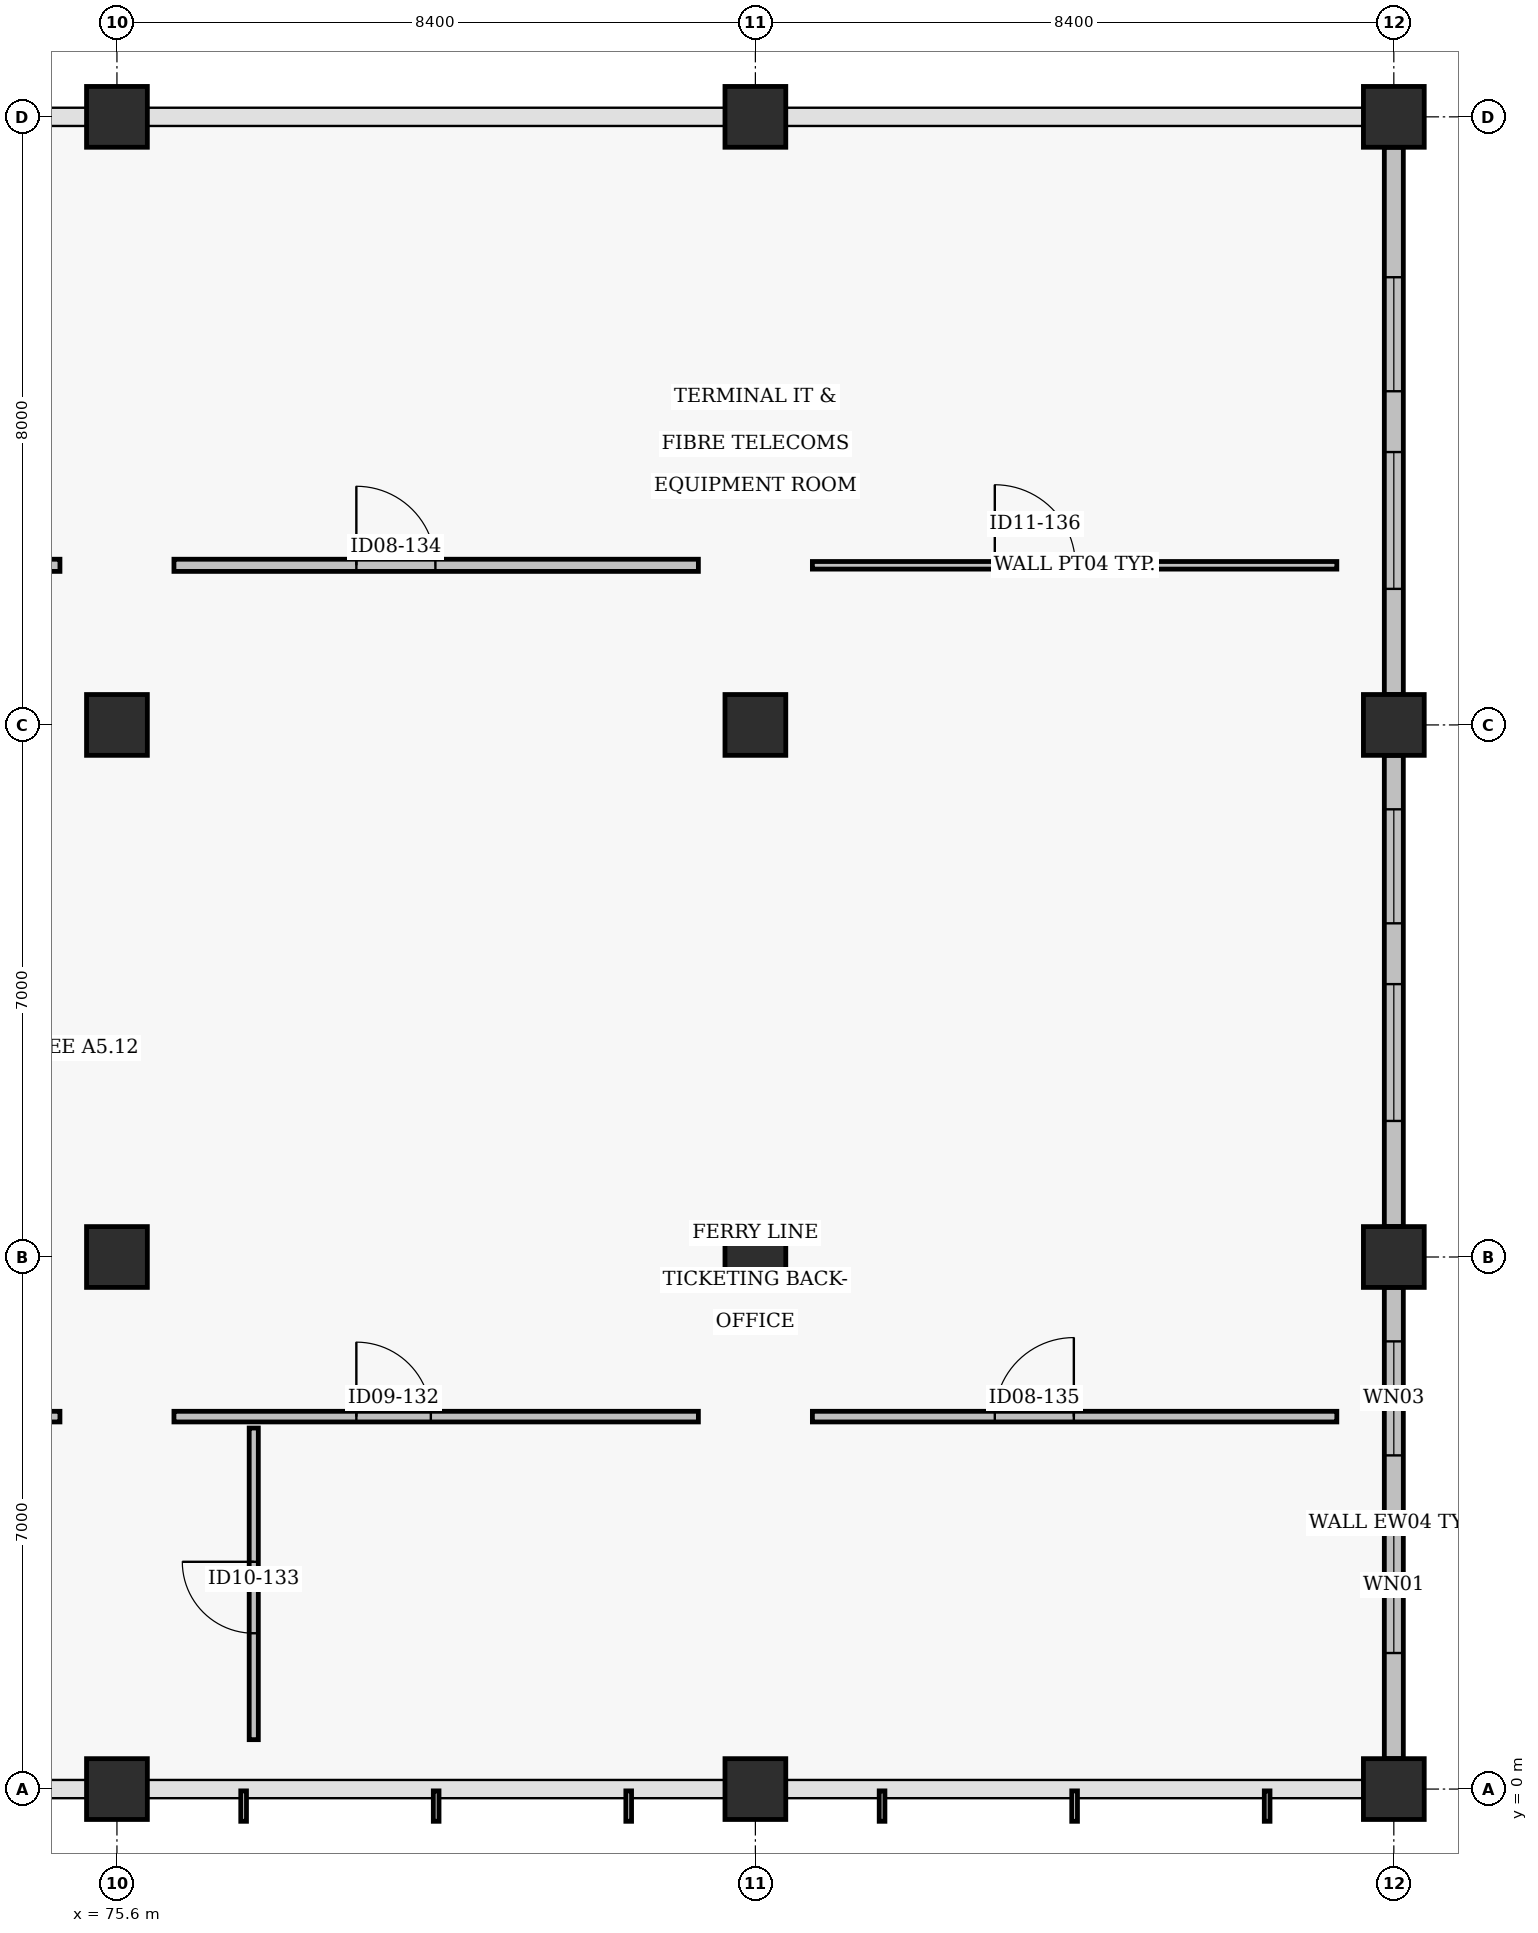
"""IFC4 building model, lengths in metres.
Left out: names, types, materials, properties, quantities, classifications, styles, units other than length and angle.
Written with IfcOpenShell. Run it as: python <this file> out.ifc"""

import sys

from ifc_helpers import new_model, si_unit, direction, frame, frame_2d, origin, origin_2d, place, context, subcontext, project, spatial, rectangle, extrude, element, fill, save


model = new_model("IFC4")
c1 = context("Model", 3, precision=1e-05, world=origin(), true_north=direction((0.0, 1.0)))
c2 = subcontext(c1, "Body", "Model", "MODEL_VIEW")
j1 = project(units=[si_unit("LENGTHUNIT", "METRE"), si_unit("PLANEANGLEUNIT", "RADIAN")], contexts=[c1])
p1 = place(None, origin())
s1 = spatial("IfcSite", under=j1, at=p1, CompositionType="ELEMENT")
p2 = place(p1, origin())
s2 = spatial("IfcBuilding", under=s1, at=p2, CompositionType="ELEMENT")
p3 = place(p2, frame((0.0, 0.0, 5.44)))
s3 = spatial("IfcBuildingStorey", under=s2, at=p3, CompositionType="ELEMENT", Elevation=5.44)
for number, where, z_axis, x_axis in (
    (1, (75.6, 0.0, 0.0), (0.0, 0.0, 1.0), (1.0, 0.0, 0.0)),
    (2, (75.6, 7.0, 0.0), (0.0, 0.0, 1.0), (1.0, 0.0, 0.0)),
    (3, (75.6, 14.0, 0.0), (0.0, 0.0, 1.0), (1.0, 0.0, 0.0)),
    (4, (75.6, 22.0, 0.0), (0.0, 0.0, 1.0), (1.0, 0.0, 0.0)),
    (5, (84.0, 0.0, 0.0), (0.0, 0.0, 1.0), (1.0, 0.0, 0.0)),
    (6, (84.0, 7.0, 0.0), (0.0, 0.0, 1.0), (1.0, 0.0, 0.0)),
    (7, (84.0, 14.0, 0.0), (0.0, 0.0, 1.0), (1.0, 0.0, 0.0)),
    (8, (84.0, 22.0, 0.0), (0.0, 0.0, 1.0), (1.0, 0.0, 0.0)),
    (9, (92.4, 0.0, 0.0), (0.0, 0.0, 1.0), (1.0, 0.0, 0.0)),
    (10, (92.4, 7.0, 0.0), (0.0, 0.0, 1.0), (1.0, 0.0, 0.0)),
    (11, (92.4, 14.0, 0.0), (0.0, 0.0, 1.0), (1.0, 0.0, 0.0)),
    (12, (92.4, 22.0, 0.0), (0.0, 0.0, 1.0), (1.0, 0.0, 0.0)),
):
    element("IfcColumn", number, at=place(p3, frame(where, z_axis=z_axis, x_axis=x_axis)), inside=s3, PredefinedType="COLUMN", context=c2, shape_type="SweptSolid", body=[
        extrude(rectangle(XDim=0.8, YDim=0.8, at=origin_2d()), origin(), (0.0, 0.0, 1.0), 4.16),
    ])
p4 = place(p3, frame((92.4, 0.4, 0.0), z_axis=(0.0, 0.0, 1.0), x_axis=(0.0, 1.0, 0.0)))
e13 = element("IfcWall", 13, at=p4, inside=s3, PredefinedType="SOLIDWALL", context=c2, shape_type="SweptSolid", body=[
    extrude(rectangle(XDim=6.2, YDim=0.25, at=frame_2d((3.1, 0.0))), origin(), (0.0, 0.0, 1.0), 3.345),
])
p5 = place(p4, frame((1.39, 0.0, 0.95)))
e14 = element("IfcOpeningElement", 14, at=p5, cuts=e13, PredefinedType="OPENING", context=c2, shape_type="SweptSolid", body=[
    extrude(rectangle(XDim=1.8, YDim=1.5, at=frame_2d((0.9, 0.75))), frame((0.0, 0.135, 0.0), z_axis=(0.0, -1.0, 0.0), x_axis=(1.0, 0.0, 0.0)), (0.0, 0.0, 1.0), 0.27),
])
p6 = place(p4, frame((3.99, 0.0, 0.95)))
e15 = element("IfcOpeningElement", 15, at=p6, cuts=e13, PredefinedType="OPENING", context=c2, shape_type="SweptSolid", body=[
    extrude(rectangle(XDim=1.5, YDim=1.5, at=frame_2d((0.75, 0.75))), frame((0.0, 0.135, 0.0), z_axis=(0.0, -1.0, 0.0), x_axis=(1.0, 0.0, 0.0)), (0.0, 0.0, 1.0), 0.27),
])
p7 = place(p3, frame((92.4, 7.4, 0.0), z_axis=(0.0, 0.0, 1.0), x_axis=(0.0, 1.0, 0.0)))
e16 = element("IfcWall", 16, at=p7, inside=s3, PredefinedType="SOLIDWALL", context=c2, shape_type="SweptSolid", body=[
    extrude(rectangle(XDim=6.2, YDim=0.25, at=frame_2d((3.1, 0.0))), origin(), (0.0, 0.0, 1.0), 3.345),
])
p8 = place(p7, frame((1.39, 0.0, 0.95)))
e17 = element("IfcOpeningElement", 17, at=p8, cuts=e16, PredefinedType="OPENING", context=c2, shape_type="SweptSolid", body=[
    extrude(rectangle(XDim=1.8, YDim=1.5, at=frame_2d((0.9, 0.75))), frame((0.0, 0.135, 0.0), z_axis=(0.0, -1.0, 0.0), x_axis=(1.0, 0.0, 0.0)), (0.0, 0.0, 1.0), 0.27),
])
p9 = place(p7, frame((3.99, 0.0, 0.95)))
e18 = element("IfcOpeningElement", 18, at=p9, cuts=e16, PredefinedType="OPENING", context=c2, shape_type="SweptSolid", body=[
    extrude(rectangle(XDim=1.5, YDim=1.5, at=frame_2d((0.75, 0.75))), frame((0.0, 0.135, 0.0), z_axis=(0.0, -1.0, 0.0), x_axis=(1.0, 0.0, 0.0)), (0.0, 0.0, 1.0), 0.27),
])
p10 = place(p3, frame((92.4, 14.4, 0.0), z_axis=(0.0, 0.0, 1.0), x_axis=(0.0, 1.0, 0.0)))
e19 = element("IfcWall", 19, at=p10, inside=s3, PredefinedType="SOLIDWALL", context=c2, shape_type="SweptSolid", body=[
    extrude(rectangle(XDim=7.2, YDim=0.25, at=frame_2d((3.6, 0.0))), origin(), (0.0, 0.0, 1.0), 3.345),
])
p11 = place(p10, frame((1.39, 0.0, 0.95)))
e20 = element("IfcOpeningElement", 20, at=p11, cuts=e19, PredefinedType="OPENING", context=c2, shape_type="SweptSolid", body=[
    extrude(rectangle(XDim=1.8, YDim=1.5, at=frame_2d((0.9, 0.75))), frame((0.0, 0.135, 0.0), z_axis=(0.0, -1.0, 0.0), x_axis=(1.0, 0.0, 0.0)), (0.0, 0.0, 1.0), 0.27),
])
p12 = place(p10, frame((3.99, 0.0, 0.95)))
e21 = element("IfcOpeningElement", 21, at=p12, cuts=e19, PredefinedType="OPENING", context=c2, shape_type="SweptSolid", body=[
    extrude(rectangle(XDim=1.5, YDim=1.5, at=frame_2d((0.75, 0.75))), frame((0.0, 0.135, 0.0), z_axis=(0.0, -1.0, 0.0), x_axis=(1.0, 0.0, 0.0)), (0.0, 0.0, 1.0), 0.27),
])
p13 = place(p3, frame((67.95, 4.9, 0.0), z_axis=(0.0, 0.0, 1.0), x_axis=(1.0, 0.0, 0.0)))
e22 = element("IfcWall", 22, at=p13, inside=s3, PredefinedType="PARTITIONING", context=c2, shape_type="SweptSolid", body=[
    extrude(rectangle(XDim=6.9, YDim=0.14, at=frame_2d((3.45, 0.0))), origin(), (0.0, 0.0, 1.0), 2.55),
])
p14 = place(p13, frame((2.4, 0.0, 0.0)))
e23 = element("IfcOpeningElement", 23, at=p14, cuts=e22, PredefinedType="OPENING", context=c2, shape_type="SweptSolid", body=[
    extrude(rectangle(XDim=1.04, YDim=2.14, at=frame_2d((0.52, 1.07))), frame((0.0, 0.08, 0.0), z_axis=(0.0, -1.0, 0.0), x_axis=(1.0, 0.0, 0.0)), (0.0, 0.0, 1.0), 0.16),
])
p15 = place(p3, frame((67.95, 16.1, 0.0), z_axis=(0.0, 0.0, 1.0), x_axis=(1.0, 0.0, 0.0)))
e24 = element("IfcWall", 24, at=p15, inside=s3, PredefinedType="PARTITIONING", context=c2, shape_type="SweptSolid", body=[
    extrude(rectangle(XDim=6.9, YDim=0.16, at=frame_2d((3.45, 0.0))), origin(), (0.0, 0.0, 1.0), 2.5),
])
p16 = place(p15, frame((2.4, 0.0, 0.0)))
e25 = element("IfcOpeningElement", 25, at=p16, cuts=e24, PredefinedType="OPENING", context=c2, shape_type="SweptSolid", body=[
    extrude(rectangle(XDim=1.04, YDim=2.14, at=frame_2d((0.52, 1.07))), frame((0.0, 0.09, 0.0), z_axis=(0.0, -1.0, 0.0), x_axis=(1.0, 0.0, 0.0)), (0.0, 0.0, 1.0), 0.18),
])
p17 = place(p3, frame((76.35, 4.9, 0.0), z_axis=(0.0, 0.0, 1.0), x_axis=(1.0, 0.0, 0.0)))
e26 = element("IfcWall", 26, at=p17, inside=s3, PredefinedType="PARTITIONING", context=c2, shape_type="SweptSolid", body=[
    extrude(rectangle(XDim=6.9, YDim=0.14, at=frame_2d((3.45, 0.0))), origin(), (0.0, 0.0, 1.0), 2.55),
])
p18 = place(p17, frame((2.4, 0.0, 0.0)))
e27 = element("IfcOpeningElement", 27, at=p18, cuts=e26, PredefinedType="OPENING", context=c2, shape_type="SweptSolid", body=[
    extrude(rectangle(XDim=0.98, YDim=2.12, at=frame_2d((0.49, 1.06))), frame((0.0, 0.08, 0.0), z_axis=(0.0, -1.0, 0.0), x_axis=(1.0, 0.0, 0.0)), (0.0, 0.0, 1.0), 0.16),
])
p19 = place(p3, frame((77.4, 0.65, 0.0), z_axis=(0.0, 0.0, 1.0), x_axis=(0.0, 1.0, 0.0)))
e28 = element("IfcWall", 28, at=p19, inside=s3, PredefinedType="PARTITIONING", context=c2, shape_type="SweptSolid", body=[
    extrude(rectangle(XDim=4.1, YDim=0.12, at=frame_2d((2.05, 0.0))), origin(), (0.0, 0.0, 1.0), 2.5),
])
p20 = place(p19, frame((1.4, 0.0, 0.0)))
e29 = element("IfcOpeningElement", 29, at=p20, cuts=e28, PredefinedType="OPENING", context=c2, shape_type="SweptSolid", body=[
    extrude(rectangle(XDim=0.94, YDim=2.08, at=frame_2d((0.47, 1.04))), frame((0.0, 0.07, 0.0), z_axis=(0.0, -1.0, 0.0), x_axis=(1.0, 0.0, 0.0)), (0.0, 0.0, 1.0), 0.14),
])
p21 = place(p3, frame((76.35, 16.1, 0.0), z_axis=(0.0, 0.0, 1.0), x_axis=(1.0, 0.0, 0.0)))
e30 = element("IfcWall", 30, at=p21, inside=s3, PredefinedType="PARTITIONING", context=c2, shape_type="SweptSolid", body=[
    extrude(rectangle(XDim=6.9, YDim=0.16, at=frame_2d((3.45, 0.0))), origin(), (0.0, 0.0, 1.0), 2.5),
])
p22 = place(p21, frame((2.4, 0.0, 0.0)))
e31 = element("IfcOpeningElement", 31, at=p22, cuts=e30, PredefinedType="OPENING", context=c2, shape_type="SweptSolid", body=[
    extrude(rectangle(XDim=1.04, YDim=2.14, at=frame_2d((0.52, 1.07))), frame((0.0, 0.09, 0.0), z_axis=(0.0, -1.0, 0.0), x_axis=(1.0, 0.0, 0.0)), (0.0, 0.0, 1.0), 0.18),
])
p23 = place(p3, frame((84.75, 4.9, 0.0), z_axis=(0.0, 0.0, 1.0), x_axis=(1.0, 0.0, 0.0)))
e32 = element("IfcWall", 32, at=p23, inside=s3, PredefinedType="PARTITIONING", context=c2, shape_type="SweptSolid", body=[
    extrude(rectangle(XDim=6.9, YDim=0.14, at=frame_2d((3.45, 0.0))), origin(), (0.0, 0.0, 1.0), 2.55),
])
p24 = place(p23, frame((2.4, 0.0, 0.0)))
e33 = element("IfcOpeningElement", 33, at=p24, cuts=e32, PredefinedType="OPENING", context=c2, shape_type="SweptSolid", body=[
    extrude(rectangle(XDim=1.04, YDim=2.14, at=frame_2d((0.52, 1.07))), frame((0.0, 0.08, 0.0), z_axis=(0.0, -1.0, 0.0), x_axis=(1.0, 0.0, 0.0)), (0.0, 0.0, 1.0), 0.16),
])
p25 = place(p3, frame((84.75, 16.1, 0.0), z_axis=(0.0, 0.0, 1.0), x_axis=(1.0, 0.0, 0.0)))
e34 = element("IfcWall", 34, at=p25, inside=s3, PredefinedType="PARTITIONING", context=c2, shape_type="SweptSolid", body=[
    extrude(rectangle(XDim=6.9, YDim=0.1, at=frame_2d((3.45, 0.0))), origin(), (0.0, 0.0, 1.0), 2.5),
])
p26 = place(p25, frame((2.4, 0.0, 0.0)))
e35 = element("IfcOpeningElement", 35, at=p26, cuts=e34, PredefinedType="OPENING", context=c2, shape_type="SweptSolid", body=[
    extrude(rectangle(XDim=1.06, YDim=2.1, at=frame_2d((0.53, 1.05))), frame((0.0, 0.06, 0.0), z_axis=(0.0, -1.0, 0.0), x_axis=(1.0, 0.0, 0.0)), (0.0, 0.0, 1.0), 0.12),
])
p27 = place(p5, origin())
e36 = element("IfcWindow", 36, at=p27, inside=s3, PartitioningType="DOUBLE_PANEL_VERTICAL", PredefinedType="WINDOW", context=c2, shape_type="SweptSolid", body=[
    extrude(rectangle(XDim=1.8, YDim=1.5, at=frame_2d((0.9, 0.75))), frame((0.0, 0.03, 0.0), z_axis=(0.0, -1.0, 0.0), x_axis=(1.0, 0.0, 0.0)), (0.0, 0.0, 1.0), 0.06),
])
fill(e14, e36)
p28 = place(p6, origin())
e37 = element("IfcWindow", 37, at=p28, inside=s3, PartitioningType="SINGLE_PANEL", PredefinedType="WINDOW", context=c2, shape_type="SweptSolid", body=[
    extrude(rectangle(XDim=1.5, YDim=1.5, at=frame_2d((0.75, 0.75))), frame((0.0, 0.03, 0.0), z_axis=(0.0, -1.0, 0.0), x_axis=(1.0, 0.0, 0.0)), (0.0, 0.0, 1.0), 0.06),
])
fill(e15, e37)
p29 = place(p8, origin())
e38 = element("IfcWindow", 38, at=p29, inside=s3, PartitioningType="DOUBLE_PANEL_VERTICAL", PredefinedType="WINDOW", context=c2, shape_type="SweptSolid", body=[
    extrude(rectangle(XDim=1.8, YDim=1.5, at=frame_2d((0.9, 0.75))), frame((0.0, 0.03, 0.0), z_axis=(0.0, -1.0, 0.0), x_axis=(1.0, 0.0, 0.0)), (0.0, 0.0, 1.0), 0.06),
])
fill(e17, e38)
p30 = place(p9, origin())
e39 = element("IfcWindow", 39, at=p30, inside=s3, PartitioningType="SINGLE_PANEL", PredefinedType="WINDOW", context=c2, shape_type="SweptSolid", body=[
    extrude(rectangle(XDim=1.5, YDim=1.5, at=frame_2d((0.75, 0.75))), frame((0.0, 0.03, 0.0), z_axis=(0.0, -1.0, 0.0), x_axis=(1.0, 0.0, 0.0)), (0.0, 0.0, 1.0), 0.06),
])
fill(e18, e39)
p31 = place(p11, origin())
e40 = element("IfcWindow", 40, at=p31, inside=s3, PartitioningType="DOUBLE_PANEL_VERTICAL", PredefinedType="WINDOW", context=c2, shape_type="SweptSolid", body=[
    extrude(rectangle(XDim=1.8, YDim=1.5, at=frame_2d((0.9, 0.75))), frame((0.0, 0.03, 0.0), z_axis=(0.0, -1.0, 0.0), x_axis=(1.0, 0.0, 0.0)), (0.0, 0.0, 1.0), 0.06),
])
fill(e20, e40)
p32 = place(p12, origin())
e41 = element("IfcWindow", 41, at=p32, inside=s3, PartitioningType="SINGLE_PANEL", PredefinedType="WINDOW", context=c2, shape_type="SweptSolid", body=[
    extrude(rectangle(XDim=1.5, YDim=1.5, at=frame_2d((0.75, 0.75))), frame((0.0, 0.03, 0.0), z_axis=(0.0, -1.0, 0.0), x_axis=(1.0, 0.0, 0.0)), (0.0, 0.0, 1.0), 0.06),
])
fill(e21, e41)
p33 = place(p18, origin())
e42 = element("IfcDoor", 42, at=p33, inside=s3, OperationType="SINGLE_SWING_LEFT", PredefinedType="DOOR", context=c2, shape_type="SweptSolid", body=[
    extrude(rectangle(XDim=0.98, YDim=2.12, at=frame_2d((0.49, 1.06))), frame((0.0, 0.025, 0.0), z_axis=(0.0, -1.0, 0.0), x_axis=(1.0, 0.0, 0.0)), (0.0, 0.0, 1.0), 0.05),
])
fill(e27, e42)
p34 = place(p20, origin())
e43 = element("IfcDoor", 43, at=p34, inside=s3, OperationType="SINGLE_SWING_RIGHT", PredefinedType="DOOR", context=c2, shape_type="SweptSolid", body=[
    extrude(rectangle(XDim=0.94, YDim=2.08, at=frame_2d((0.47, 1.04))), frame((0.0, 0.025, 0.0), z_axis=(0.0, -1.0, 0.0), x_axis=(1.0, 0.0, 0.0)), (0.0, 0.0, 1.0), 0.05),
])
fill(e29, e43)
p35 = place(p22, origin())
e44 = element("IfcDoor", 44, at=p35, inside=s3, OperationType="SINGLE_SWING_LEFT", PredefinedType="DOOR", context=c2, shape_type="SweptSolid", body=[
    extrude(rectangle(XDim=1.04, YDim=2.14, at=frame_2d((0.52, 1.07))), frame((0.0, 0.025, 0.0), z_axis=(0.0, -1.0, 0.0), x_axis=(1.0, 0.0, 0.0)), (0.0, 0.0, 1.0), 0.05),
])
fill(e31, e44)
p36 = place(p24, origin())
e45 = element("IfcDoor", 45, at=p36, inside=s3, OperationType="SINGLE_SWING_RIGHT", PredefinedType="DOOR", context=c2, shape_type="SweptSolid", body=[
    extrude(rectangle(XDim=1.04, YDim=2.14, at=frame_2d((0.52, 1.07))), frame((0.0, 0.025, 0.0), z_axis=(0.0, -1.0, 0.0), x_axis=(1.0, 0.0, 0.0)), (0.0, 0.0, 1.0), 0.05),
])
fill(e33, e45)
p37 = place(p26, origin())
e46 = element("IfcDoor", 46, at=p37, inside=s3, OperationType="SINGLE_SWING_LEFT", PredefinedType="DOOR", context=c2, shape_type="SweptSolid", body=[
    extrude(rectangle(XDim=1.06, YDim=2.1, at=frame_2d((0.53, 1.05))), frame((0.0, 0.025, 0.0), z_axis=(0.0, -1.0, 0.0), x_axis=(1.0, 0.0, 0.0)), (0.0, 0.0, 1.0), 0.05),
])
fill(e35, e46)
save(model, sys.argv[1])
